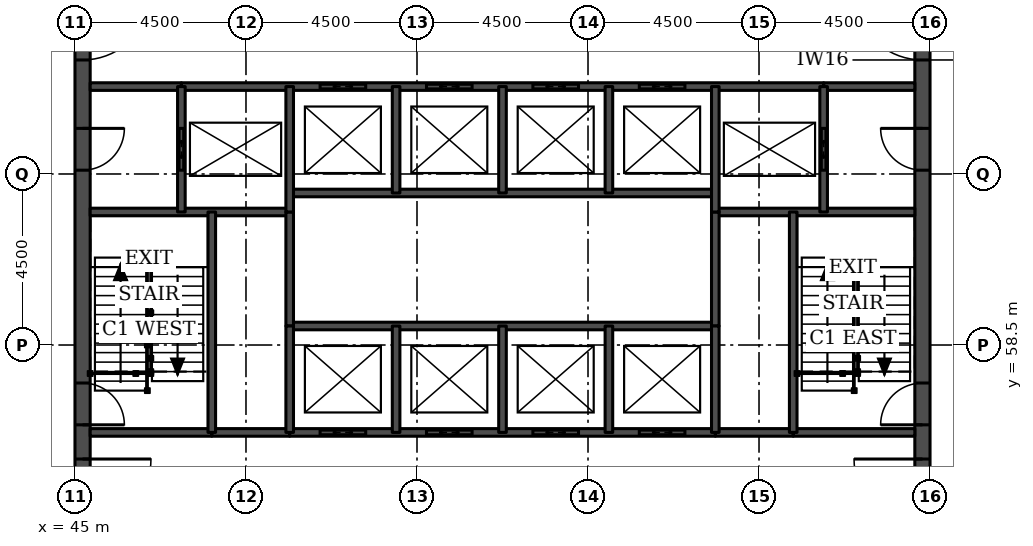
"""IFC4 building model, lengths in metres.
Left out: names, types, materials, properties, quantities, classifications, styles, units other than length and angle.
Written with IfcOpenShell. Run it as: python <this file> out.ifc"""

import sys

from ifc_helpers import new_model, si_unit, direction, frame, frame_2d, origin, place, context, subcontext, project, spatial, rectangle, extrude, element, fill, save


model = new_model("IFC4")
c1 = context("Model", 3, precision=1e-05, world=origin(), true_north=direction((0.0, 1.0)))
c2 = subcontext(c1, "Body", "Model", "MODEL_VIEW")
j1 = project(units=[si_unit("LENGTHUNIT", "METRE"), si_unit("PLANEANGLEUNIT", "RADIAN")], contexts=[c1])
p1 = place(None, origin())
s1 = spatial("IfcSite", under=j1, at=p1, CompositionType="ELEMENT")
p2 = place(p1, origin())
s2 = spatial("IfcBuilding", under=s1, at=p2, CompositionType="ELEMENT")
p3 = place(p2, frame((0.0, 0.0, 184.7)))
s3 = spatial("IfcBuildingStorey", under=s2, at=p3, CompositionType="ELEMENT", Elevation=184.7)
p4 = place(p3, frame((45.2, 49.5, 0.0), z_axis=(0.0, 0.0, 1.0), x_axis=(0.0, 1.0, 0.0)))
e1 = element("IfcWall", 1, at=p4, inside=s3, PredefinedType="SHEAR", context=c2, shape_type="SweptSolid", body=[
    extrude(rectangle(XDim=22.5, YDim=0.4, at=frame_2d((11.25, 0.0))), origin(), (0.0, 0.0, 1.0), 3.7),
])
p5 = place(p4, frame((4.2, 0.0, 0.0)))
e2 = element("IfcOpeningElement", 2, at=p5, cuts=e1, PredefinedType="OPENING", context=c2, shape_type="SweptSolid", body=[
    extrude(rectangle(XDim=1.8, YDim=2.1, at=frame_2d((0.9, 1.05))), frame((0.0, 0.21, 0.0), z_axis=(0.0, -1.0, 0.0), x_axis=(1.0, 0.0, 0.0)), (0.0, 0.0, 1.0), 0.42),
])
p6 = place(p4, frame((6.9, 0.0, 0.0)))
e3 = element("IfcOpeningElement", 3, at=p6, cuts=e1, PredefinedType="OPENING", context=c2, shape_type="SweptSolid", body=[
    extrude(rectangle(XDim=1.1, YDim=2.1, at=frame_2d((0.55, 1.05))), frame((0.0, 0.21, 0.0), z_axis=(0.0, -1.0, 0.0), x_axis=(1.0, 0.0, 0.0)), (0.0, 0.0, 1.0), 0.42),
])
p7 = place(p4, frame((13.6, 0.0, 0.0)))
e4 = element("IfcOpeningElement", 4, at=p7, cuts=e1, PredefinedType="OPENING", context=c2, shape_type="SweptSolid", body=[
    extrude(rectangle(XDim=1.1, YDim=2.1, at=frame_2d((0.55, 1.05))), frame((0.0, 0.21, 0.0), z_axis=(0.0, -1.0, 0.0), x_axis=(1.0, 0.0, 0.0)), (0.0, 0.0, 1.0), 0.42),
])
p8 = place(p4, frame((16.5, 0.0, 0.0)))
e5 = element("IfcOpeningElement", 5, at=p8, cuts=e1, PredefinedType="OPENING", context=c2, shape_type="SweptSolid", body=[
    extrude(rectangle(XDim=1.8, YDim=2.1, at=frame_2d((0.9, 1.05))), frame((0.0, 0.21, 0.0), z_axis=(0.0, -1.0, 0.0), x_axis=(1.0, 0.0, 0.0)), (0.0, 0.0, 1.0), 0.42),
])
p9 = place(p3, frame((67.3, 49.5, 0.0), z_axis=(0.0, 0.0, 1.0), x_axis=(0.0, 1.0, 0.0)))
e6 = element("IfcWall", 6, at=p9, inside=s3, PredefinedType="SHEAR", context=c2, shape_type="SweptSolid", body=[
    extrude(rectangle(XDim=22.5, YDim=0.4, at=frame_2d((11.25, 0.0))), origin(), (0.0, 0.0, 1.0), 3.7),
])
p10 = place(p9, frame((4.2, 0.0, 0.0)))
e7 = element("IfcOpeningElement", 7, at=p10, cuts=e6, PredefinedType="OPENING", context=c2, shape_type="SweptSolid", body=[
    extrude(rectangle(XDim=1.8, YDim=2.1, at=frame_2d((0.9, 1.05))), frame((0.0, 0.21, 0.0), z_axis=(0.0, -1.0, 0.0), x_axis=(1.0, 0.0, 0.0)), (0.0, 0.0, 1.0), 0.42),
])
p11 = place(p9, frame((6.9, 0.0, 0.0)))
e8 = element("IfcOpeningElement", 8, at=p11, cuts=e6, PredefinedType="OPENING", context=c2, shape_type="SweptSolid", body=[
    extrude(rectangle(XDim=1.1, YDim=2.1, at=frame_2d((0.55, 1.05))), frame((0.0, 0.21, 0.0), z_axis=(0.0, -1.0, 0.0), x_axis=(1.0, 0.0, 0.0)), (0.0, 0.0, 1.0), 0.42),
])
p12 = place(p9, frame((13.6, 0.0, 0.0)))
e9 = element("IfcOpeningElement", 9, at=p12, cuts=e6, PredefinedType="OPENING", context=c2, shape_type="SweptSolid", body=[
    extrude(rectangle(XDim=1.1, YDim=2.1, at=frame_2d((0.55, 1.05))), frame((0.0, 0.21, 0.0), z_axis=(0.0, -1.0, 0.0), x_axis=(1.0, 0.0, 0.0)), (0.0, 0.0, 1.0), 0.42),
])
p13 = place(p9, frame((16.5, 0.0, 0.0)))
e10 = element("IfcOpeningElement", 10, at=p13, cuts=e6, PredefinedType="OPENING", context=c2, shape_type="SweptSolid", body=[
    extrude(rectangle(XDim=1.8, YDim=2.1, at=frame_2d((0.9, 1.05))), frame((0.0, 0.21, 0.0), z_axis=(0.0, -1.0, 0.0), x_axis=(1.0, 0.0, 0.0)), (0.0, 0.0, 1.0), 0.42),
])
for number, where, z_axis, x_axis in (
    (11, (48.6, 56.2, 0.0), (0.0, 0.0, 1.0), (1.0, 0.0, 0.0)),
    (12, (61.85, 56.2, 0.0), (0.0, 0.0, 1.0), (1.0, 0.0, 0.0)),
):
    element("IfcWall", number, at=place(p3, frame(where, z_axis=z_axis, x_axis=x_axis)), inside=s3, PredefinedType="SOLIDWALL", context=c2, shape_type="SweptSolid", body=[
        extrude(rectangle(XDim=2.05, YDim=0.2, at=frame_2d((1.025, 0.0))), origin(), (0.0, 0.0, 1.0), 3.55),
    ])
p14 = place(p3, frame((45.4, 56.2, 0.0), z_axis=(0.0, 0.0, 1.0), x_axis=(1.0, 0.0, 0.0)))
e13 = element("IfcWall", 13, at=p14, inside=s3, PredefinedType="SOLIDWALL", context=c2, shape_type="SweptSolid", body=[
    extrude(rectangle(XDim=3.2, YDim=0.2, at=frame_2d((1.6, 0.0))), origin(), (0.0, 0.0, 1.0), 3.55),
])
p15 = place(p3, frame((50.65, 56.2, 0.0), z_axis=(0.0, 0.0, 1.0), x_axis=(1.0, 0.0, 0.0)))
e14 = element("IfcWall", 14, at=p15, inside=s3, PredefinedType="SOLIDWALL", context=c2, shape_type="SweptSolid", body=[
    extrude(rectangle(XDim=11.2, YDim=0.2, at=frame_2d((5.6, 0.0))), origin(), (0.0, 0.0, 1.0), 3.55),
])
p16 = place(p15, frame((0.8, 0.0, 0.0)))
e15 = element("IfcOpeningElement", 15, at=p16, cuts=e14, PredefinedType="OPENING", context=c2, shape_type="SweptSolid", body=[
    extrude(rectangle(XDim=1.2, YDim=2.1, at=frame_2d((0.6, 1.05))), frame((0.0, 0.11, 0.0), z_axis=(0.0, -1.0, 0.0), x_axis=(1.0, 0.0, 0.0)), (0.0, 0.0, 1.0), 0.22),
])
p17 = place(p15, frame((3.6, 0.0, 0.0)))
e16 = element("IfcOpeningElement", 16, at=p17, cuts=e14, PredefinedType="OPENING", context=c2, shape_type="SweptSolid", body=[
    extrude(rectangle(XDim=1.2, YDim=2.1, at=frame_2d((0.6, 1.05))), frame((0.0, 0.11, 0.0), z_axis=(0.0, -1.0, 0.0), x_axis=(1.0, 0.0, 0.0)), (0.0, 0.0, 1.0), 0.22),
])
p18 = place(p15, frame((6.4, 0.0, 0.0)))
e17 = element("IfcOpeningElement", 17, at=p18, cuts=e14, PredefinedType="OPENING", context=c2, shape_type="SweptSolid", body=[
    extrude(rectangle(XDim=1.2, YDim=2.1, at=frame_2d((0.6, 1.05))), frame((0.0, 0.11, 0.0), z_axis=(0.0, -1.0, 0.0), x_axis=(1.0, 0.0, 0.0)), (0.0, 0.0, 1.0), 0.22),
])
p19 = place(p15, frame((9.2, 0.0, 0.0)))
e18 = element("IfcOpeningElement", 18, at=p19, cuts=e14, PredefinedType="OPENING", context=c2, shape_type="SweptSolid", body=[
    extrude(rectangle(XDim=1.2, YDim=2.1, at=frame_2d((0.6, 1.05))), frame((0.0, 0.11, 0.0), z_axis=(0.0, -1.0, 0.0), x_axis=(1.0, 0.0, 0.0)), (0.0, 0.0, 1.0), 0.22),
])
p20 = place(p3, frame((63.9, 56.2, 0.0), z_axis=(0.0, 0.0, 1.0), x_axis=(1.0, 0.0, 0.0)))
e19 = element("IfcWall", 19, at=p20, inside=s3, PredefinedType="SOLIDWALL", context=c2, shape_type="SweptSolid", body=[
    extrude(rectangle(XDim=3.2, YDim=0.2, at=frame_2d((1.6, 0.0))), origin(), (0.0, 0.0, 1.0), 3.55),
])
p21 = place(p3, frame((50.65, 59.0, 0.0), z_axis=(0.0, 0.0, 1.0), x_axis=(1.0, 0.0, 0.0)))
e20 = element("IfcWall", 20, at=p21, inside=s3, PredefinedType="SOLIDWALL", context=c2, shape_type="SweptSolid", body=[
    extrude(rectangle(XDim=11.2, YDim=0.2, at=frame_2d((5.6, 0.0))), origin(), (0.0, 0.0, 1.0), 3.7),
])
for number, where, z_axis, x_axis in (
    (21, (45.4, 62.0, 0.0), (0.0, 0.0, 1.0), (1.0, 0.0, 0.0)),
    (22, (61.85, 62.0, 0.0), (0.0, 0.0, 1.0), (1.0, 0.0, 0.0)),
):
    element("IfcWall", number, at=place(p3, frame(where, z_axis=z_axis, x_axis=x_axis)), inside=s3, PredefinedType="SOLIDWALL", context=c2, shape_type="SweptSolid", body=[
        extrude(rectangle(XDim=5.25, YDim=0.2, at=frame_2d((2.625, 0.0))), origin(), (0.0, 0.0, 1.0), 3.55),
    ])
p22 = place(p3, frame((50.65, 62.5, 0.0), z_axis=(0.0, 0.0, 1.0), x_axis=(1.0, 0.0, 0.0)))
e23 = element("IfcWall", 23, at=p22, inside=s3, PredefinedType="SOLIDWALL", context=c2, shape_type="SweptSolid", body=[
    extrude(rectangle(XDim=11.2, YDim=0.2, at=frame_2d((5.6, 0.0))), origin(), (0.0, 0.0, 1.0), 3.7),
])
for number, where, z_axis, x_axis in (
    (24, (45.4, 65.3, 0.0), (0.0, 0.0, 1.0), (1.0, 0.0, 0.0)),
    (25, (64.7, 65.3, 0.0), (0.0, 0.0, 1.0), (1.0, 0.0, 0.0)),
):
    element("IfcWall", number, at=place(p3, frame(where, z_axis=z_axis, x_axis=x_axis)), inside=s3, PredefinedType="SOLIDWALL", context=c2, shape_type="SweptSolid", body=[
        extrude(rectangle(XDim=2.4, YDim=0.2, at=frame_2d((1.2, 0.0))), origin(), (0.0, 0.0, 1.0), 3.55),
    ])
p23 = place(p3, frame((47.8, 65.3, 0.0), z_axis=(0.0, 0.0, 1.0), x_axis=(1.0, 0.0, 0.0)))
e26 = element("IfcWall", 26, at=p23, inside=s3, PredefinedType="SOLIDWALL", context=c2, shape_type="SweptSolid", body=[
    extrude(rectangle(XDim=16.9, YDim=0.2, at=frame_2d((8.45, 0.0))), origin(), (0.0, 0.0, 1.0), 3.55),
])
p24 = place(p23, frame((3.65, 0.0, 0.0)))
e27 = element("IfcOpeningElement", 27, at=p24, cuts=e26, PredefinedType="OPENING", context=c2, shape_type="SweptSolid", body=[
    extrude(rectangle(XDim=1.2, YDim=2.1, at=frame_2d((0.6, 1.05))), frame((0.0, 0.11, 0.0), z_axis=(0.0, -1.0, 0.0), x_axis=(1.0, 0.0, 0.0)), (0.0, 0.0, 1.0), 0.22),
])
p25 = place(p23, frame((6.45, 0.0, 0.0)))
e28 = element("IfcOpeningElement", 28, at=p25, cuts=e26, PredefinedType="OPENING", context=c2, shape_type="SweptSolid", body=[
    extrude(rectangle(XDim=1.2, YDim=2.1, at=frame_2d((0.6, 1.05))), frame((0.0, 0.11, 0.0), z_axis=(0.0, -1.0, 0.0), x_axis=(1.0, 0.0, 0.0)), (0.0, 0.0, 1.0), 0.22),
])
p26 = place(p23, frame((9.25, 0.0, 0.0)))
e29 = element("IfcOpeningElement", 29, at=p26, cuts=e26, PredefinedType="OPENING", context=c2, shape_type="SweptSolid", body=[
    extrude(rectangle(XDim=1.2, YDim=2.1, at=frame_2d((0.6, 1.05))), frame((0.0, 0.11, 0.0), z_axis=(0.0, -1.0, 0.0), x_axis=(1.0, 0.0, 0.0)), (0.0, 0.0, 1.0), 0.22),
])
p27 = place(p23, frame((12.05, 0.0, 0.0)))
e30 = element("IfcOpeningElement", 30, at=p27, cuts=e26, PredefinedType="OPENING", context=c2, shape_type="SweptSolid", body=[
    extrude(rectangle(XDim=1.2, YDim=2.1, at=frame_2d((0.6, 1.05))), frame((0.0, 0.11, 0.0), z_axis=(0.0, -1.0, 0.0), x_axis=(1.0, 0.0, 0.0)), (0.0, 0.0, 1.0), 0.22),
])
p28 = place(p3, frame((47.8, 62.0, 0.0), z_axis=(0.0, 0.0, 1.0), x_axis=(0.0, 1.0, 0.0)))
e31 = element("IfcWall", 31, at=p28, inside=s3, PredefinedType="SOLIDWALL", context=c2, shape_type="SweptSolid", body=[
    extrude(rectangle(XDim=3.3, YDim=0.2, at=frame_2d((1.65, 0.0))), origin(), (0.0, 0.0, 1.0), 3.55),
])
p29 = place(p28, frame((1.1, 0.0, 0.0)))
e32 = element("IfcOpeningElement", 32, at=p29, cuts=e31, PredefinedType="OPENING", context=c2, shape_type="SweptSolid", body=[
    extrude(rectangle(XDim=1.1, YDim=2.1, at=frame_2d((0.55, 1.05))), frame((0.0, 0.11, 0.0), z_axis=(0.0, -1.0, 0.0), x_axis=(1.0, 0.0, 0.0)), (0.0, 0.0, 1.0), 0.22),
])
p30 = place(p3, frame((48.6, 56.2, 0.0), z_axis=(0.0, 0.0, 1.0), x_axis=(0.0, 1.0, 0.0)))
e33 = element("IfcWall", 33, at=p30, inside=s3, PredefinedType="SOLIDWALL", context=c2, shape_type="SweptSolid", body=[
    extrude(rectangle(XDim=5.8, YDim=0.2, at=frame_2d((2.9, 0.0))), origin(), (0.0, 0.0, 1.0), 3.55),
])
p31 = place(p3, frame((50.65, 59.0, 0.0), z_axis=(0.0, 0.0, 1.0), x_axis=(0.0, 1.0, 0.0)))
e34 = element("IfcWall", 34, at=p31, inside=s3, PredefinedType="SOLIDWALL", context=c2, shape_type="SweptSolid", body=[
    extrude(rectangle(XDim=3.0, YDim=0.2, at=frame_2d((1.5, 0.0))), origin(), (0.0, 0.0, 1.0), 3.7),
])
p32 = place(p3, frame((50.65, 56.2, 0.0), z_axis=(0.0, 0.0, 1.0), x_axis=(0.0, 1.0, 0.0)))
e35 = element("IfcWall", 35, at=p32, inside=s3, PredefinedType="SOLIDWALL", context=c2, shape_type="SweptSolid", body=[
    extrude(rectangle(XDim=2.8, YDim=0.2, at=frame_2d((1.4, 0.0))), origin(), (0.0, 0.0, 1.0), 3.55),
])
p33 = place(p3, frame((50.65, 62.0, 0.0), z_axis=(0.0, 0.0, 1.0), x_axis=(0.0, 1.0, 0.0)))
e36 = element("IfcWall", 36, at=p33, inside=s3, PredefinedType="SOLIDWALL", context=c2, shape_type="SweptSolid", body=[
    extrude(rectangle(XDim=3.3, YDim=0.2, at=frame_2d((1.65, 0.0))), origin(), (0.0, 0.0, 1.0), 3.55),
])
for number, where, z_axis, x_axis in (
    (37, (53.45, 56.2, 0.0), (0.0, 0.0, 1.0), (0.0, 1.0, 0.0)),
    (38, (53.45, 62.5, 0.0), (0.0, 0.0, 1.0), (0.0, 1.0, 0.0)),
    (39, (56.25, 56.2, 0.0), (0.0, 0.0, 1.0), (0.0, 1.0, 0.0)),
    (40, (56.25, 62.5, 0.0), (0.0, 0.0, 1.0), (0.0, 1.0, 0.0)),
    (41, (59.05, 56.2, 0.0), (0.0, 0.0, 1.0), (0.0, 1.0, 0.0)),
    (42, (59.05, 62.5, 0.0), (0.0, 0.0, 1.0), (0.0, 1.0, 0.0)),
):
    element("IfcWall", number, at=place(p3, frame(where, z_axis=z_axis, x_axis=x_axis)), inside=s3, PredefinedType="SOLIDWALL", context=c2, shape_type="SweptSolid", body=[
        extrude(rectangle(XDim=2.8, YDim=0.2, at=frame_2d((1.4, 0.0))), origin(), (0.0, 0.0, 1.0), 3.55),
    ])
p34 = place(p3, frame((61.85, 59.0, 0.0), z_axis=(0.0, 0.0, 1.0), x_axis=(0.0, 1.0, 0.0)))
e43 = element("IfcWall", 43, at=p34, inside=s3, PredefinedType="SOLIDWALL", context=c2, shape_type="SweptSolid", body=[
    extrude(rectangle(XDim=3.0, YDim=0.2, at=frame_2d((1.5, 0.0))), origin(), (0.0, 0.0, 1.0), 3.7),
])
p35 = place(p3, frame((61.85, 56.2, 0.0), z_axis=(0.0, 0.0, 1.0), x_axis=(0.0, 1.0, 0.0)))
e44 = element("IfcWall", 44, at=p35, inside=s3, PredefinedType="SOLIDWALL", context=c2, shape_type="SweptSolid", body=[
    extrude(rectangle(XDim=2.8, YDim=0.2, at=frame_2d((1.4, 0.0))), origin(), (0.0, 0.0, 1.0), 3.55),
])
p36 = place(p3, frame((61.85, 62.0, 0.0), z_axis=(0.0, 0.0, 1.0), x_axis=(0.0, 1.0, 0.0)))
e45 = element("IfcWall", 45, at=p36, inside=s3, PredefinedType="SOLIDWALL", context=c2, shape_type="SweptSolid", body=[
    extrude(rectangle(XDim=3.3, YDim=0.2, at=frame_2d((1.65, 0.0))), origin(), (0.0, 0.0, 1.0), 3.55),
])
p37 = place(p3, frame((63.9, 56.2, 0.0), z_axis=(0.0, 0.0, 1.0), x_axis=(0.0, 1.0, 0.0)))
e46 = element("IfcWall", 46, at=p37, inside=s3, PredefinedType="SOLIDWALL", context=c2, shape_type="SweptSolid", body=[
    extrude(rectangle(XDim=5.8, YDim=0.2, at=frame_2d((2.9, 0.0))), origin(), (0.0, 0.0, 1.0), 3.55),
])
p38 = place(p3, frame((64.7, 62.0, 0.0), z_axis=(0.0, 0.0, 1.0), x_axis=(0.0, 1.0, 0.0)))
e47 = element("IfcWall", 47, at=p38, inside=s3, PredefinedType="SOLIDWALL", context=c2, shape_type="SweptSolid", body=[
    extrude(rectangle(XDim=3.3, YDim=0.2, at=frame_2d((1.65, 0.0))), origin(), (0.0, 0.0, 1.0), 3.55),
])
p39 = place(p38, frame((1.1, 0.0, 0.0)))
e48 = element("IfcOpeningElement", 48, at=p39, cuts=e47, PredefinedType="OPENING", context=c2, shape_type="SweptSolid", body=[
    extrude(rectangle(XDim=1.1, YDim=2.1, at=frame_2d((0.55, 1.05))), frame((0.0, 0.11, 0.0), z_axis=(0.0, -1.0, 0.0), x_axis=(1.0, 0.0, 0.0)), (0.0, 0.0, 1.0), 0.22),
])
p40 = place(p16, origin())
e49 = element("IfcDoor", 49, at=p40, inside=s3, OperationType="DOUBLE_DOOR_SLIDING", PredefinedType="DOOR", context=c2, shape_type="SweptSolid", body=[
    extrude(rectangle(XDim=1.2, YDim=2.1, at=frame_2d((0.6, 1.05))), frame((0.0, 0.025, 0.0), z_axis=(0.0, -1.0, 0.0), x_axis=(1.0, 0.0, 0.0)), (0.0, 0.0, 1.0), 0.05),
])
fill(e15, e49)
p41 = place(p17, origin())
e50 = element("IfcDoor", 50, at=p41, inside=s3, OperationType="DOUBLE_DOOR_SLIDING", PredefinedType="DOOR", context=c2, shape_type="SweptSolid", body=[
    extrude(rectangle(XDim=1.2, YDim=2.1, at=frame_2d((0.6, 1.05))), frame((0.0, 0.025, 0.0), z_axis=(0.0, -1.0, 0.0), x_axis=(1.0, 0.0, 0.0)), (0.0, 0.0, 1.0), 0.05),
])
fill(e16, e50)
p42 = place(p18, origin())
e51 = element("IfcDoor", 51, at=p42, inside=s3, OperationType="DOUBLE_DOOR_SLIDING", PredefinedType="DOOR", context=c2, shape_type="SweptSolid", body=[
    extrude(rectangle(XDim=1.2, YDim=2.1, at=frame_2d((0.6, 1.05))), frame((0.0, 0.025, 0.0), z_axis=(0.0, -1.0, 0.0), x_axis=(1.0, 0.0, 0.0)), (0.0, 0.0, 1.0), 0.05),
])
fill(e17, e51)
p43 = place(p19, origin())
e52 = element("IfcDoor", 52, at=p43, inside=s3, OperationType="DOUBLE_DOOR_SLIDING", PredefinedType="DOOR", context=c2, shape_type="SweptSolid", body=[
    extrude(rectangle(XDim=1.2, YDim=2.1, at=frame_2d((0.6, 1.05))), frame((0.0, 0.025, 0.0), z_axis=(0.0, -1.0, 0.0), x_axis=(1.0, 0.0, 0.0)), (0.0, 0.0, 1.0), 0.05),
])
fill(e18, e52)
p44 = place(p24, origin())
e53 = element("IfcDoor", 53, at=p44, inside=s3, OperationType="DOUBLE_DOOR_SLIDING", PredefinedType="DOOR", context=c2, shape_type="SweptSolid", body=[
    extrude(rectangle(XDim=1.2, YDim=2.1, at=frame_2d((0.6, 1.05))), frame((0.0, 0.025, 0.0), z_axis=(0.0, -1.0, 0.0), x_axis=(1.0, 0.0, 0.0)), (0.0, 0.0, 1.0), 0.05),
])
fill(e27, e53)
p45 = place(p25, origin())
e54 = element("IfcDoor", 54, at=p45, inside=s3, OperationType="DOUBLE_DOOR_SLIDING", PredefinedType="DOOR", context=c2, shape_type="SweptSolid", body=[
    extrude(rectangle(XDim=1.2, YDim=2.1, at=frame_2d((0.6, 1.05))), frame((0.0, 0.025, 0.0), z_axis=(0.0, -1.0, 0.0), x_axis=(1.0, 0.0, 0.0)), (0.0, 0.0, 1.0), 0.05),
])
fill(e28, e54)
p46 = place(p26, origin())
e55 = element("IfcDoor", 55, at=p46, inside=s3, OperationType="DOUBLE_DOOR_SLIDING", PredefinedType="DOOR", context=c2, shape_type="SweptSolid", body=[
    extrude(rectangle(XDim=1.2, YDim=2.1, at=frame_2d((0.6, 1.05))), frame((0.0, 0.025, 0.0), z_axis=(0.0, -1.0, 0.0), x_axis=(1.0, 0.0, 0.0)), (0.0, 0.0, 1.0), 0.05),
])
fill(e29, e55)
p47 = place(p27, origin())
e56 = element("IfcDoor", 56, at=p47, inside=s3, OperationType="DOUBLE_DOOR_SLIDING", PredefinedType="DOOR", context=c2, shape_type="SweptSolid", body=[
    extrude(rectangle(XDim=1.2, YDim=2.1, at=frame_2d((0.6, 1.05))), frame((0.0, 0.025, 0.0), z_axis=(0.0, -1.0, 0.0), x_axis=(1.0, 0.0, 0.0)), (0.0, 0.0, 1.0), 0.05),
])
fill(e30, e56)
p48 = place(p29, origin())
e57 = element("IfcDoor", 57, at=p48, inside=s3, OperationType="DOUBLE_DOOR_SLIDING", PredefinedType="DOOR", context=c2, shape_type="SweptSolid", body=[
    extrude(rectangle(XDim=1.1, YDim=2.1, at=frame_2d((0.55, 1.05))), frame((0.0, 0.025, 0.0), z_axis=(0.0, -1.0, 0.0), x_axis=(1.0, 0.0, 0.0)), (0.0, 0.0, 1.0), 0.05),
])
fill(e32, e57)
p49 = place(p39, origin())
e58 = element("IfcDoor", 58, at=p49, inside=s3, OperationType="DOUBLE_DOOR_SLIDING", PredefinedType="DOOR", context=c2, shape_type="SweptSolid", body=[
    extrude(rectangle(XDim=1.1, YDim=2.1, at=frame_2d((0.55, 1.05))), frame((0.0, 0.025, 0.0), z_axis=(0.0, -1.0, 0.0), x_axis=(1.0, 0.0, 0.0)), (0.0, 0.0, 1.0), 0.05),
])
fill(e48, e58)
p50 = place(p5, frame((1.8, 0.0, 0.0), z_axis=(0.0, 0.0, 1.0), x_axis=(-1.0, 0.0, 0.0)))
e59 = element("IfcDoor", 59, at=p50, inside=s3, OperationType="SINGLE_SWING_LEFT", PredefinedType="DOOR", context=c2, shape_type="SweptSolid", body=[
    extrude(rectangle(XDim=1.8, YDim=2.1, at=frame_2d((0.9, 1.05))), frame((0.0, 0.025, 0.0), z_axis=(0.0, -1.0, 0.0), x_axis=(1.0, 0.0, 0.0)), (0.0, 0.0, 1.0), 0.05),
])
fill(e2, e59)
p51 = place(p6, frame((1.1, 0.0, 0.0), z_axis=(0.0, 0.0, 1.0), x_axis=(-1.0, 0.0, 0.0)))
e60 = element("IfcDoor", 60, at=p51, inside=s3, OperationType="SINGLE_SWING_RIGHT", PredefinedType="DOOR", context=c2, shape_type="SweptSolid", body=[
    extrude(rectangle(XDim=1.1, YDim=2.1, at=frame_2d((0.55, 1.05))), frame((0.0, 0.025, 0.0), z_axis=(0.0, -1.0, 0.0), x_axis=(1.0, 0.0, 0.0)), (0.0, 0.0, 1.0), 0.05),
])
fill(e3, e60)
p52 = place(p7, frame((1.1, 0.0, 0.0), z_axis=(0.0, 0.0, 1.0), x_axis=(-1.0, 0.0, 0.0)))
e61 = element("IfcDoor", 61, at=p52, inside=s3, OperationType="SINGLE_SWING_LEFT", PredefinedType="DOOR", context=c2, shape_type="SweptSolid", body=[
    extrude(rectangle(XDim=1.1, YDim=2.1, at=frame_2d((0.55, 1.05))), frame((0.0, 0.025, 0.0), z_axis=(0.0, -1.0, 0.0), x_axis=(1.0, 0.0, 0.0)), (0.0, 0.0, 1.0), 0.05),
])
fill(e4, e61)
p53 = place(p8, frame((1.8, 0.0, 0.0), z_axis=(0.0, 0.0, 1.0), x_axis=(-1.0, 0.0, 0.0)))
e62 = element("IfcDoor", 62, at=p53, inside=s3, OperationType="SINGLE_SWING_LEFT", PredefinedType="DOOR", context=c2, shape_type="SweptSolid", body=[
    extrude(rectangle(XDim=1.8, YDim=2.1, at=frame_2d((0.9, 1.05))), frame((0.0, 0.025, 0.0), z_axis=(0.0, -1.0, 0.0), x_axis=(1.0, 0.0, 0.0)), (0.0, 0.0, 1.0), 0.05),
])
fill(e5, e62)
p54 = place(p10, origin())
e63 = element("IfcDoor", 63, at=p54, inside=s3, OperationType="SINGLE_SWING_RIGHT", PredefinedType="DOOR", context=c2, shape_type="SweptSolid", body=[
    extrude(rectangle(XDim=1.8, YDim=2.1, at=frame_2d((0.9, 1.05))), frame((0.0, 0.025, 0.0), z_axis=(0.0, -1.0, 0.0), x_axis=(1.0, 0.0, 0.0)), (0.0, 0.0, 1.0), 0.05),
])
fill(e7, e63)
p55 = place(p11, origin())
e64 = element("IfcDoor", 64, at=p55, inside=s3, OperationType="SINGLE_SWING_LEFT", PredefinedType="DOOR", context=c2, shape_type="SweptSolid", body=[
    extrude(rectangle(XDim=1.1, YDim=2.1, at=frame_2d((0.55, 1.05))), frame((0.0, 0.025, 0.0), z_axis=(0.0, -1.0, 0.0), x_axis=(1.0, 0.0, 0.0)), (0.0, 0.0, 1.0), 0.05),
])
fill(e8, e64)
p56 = place(p12, origin())
e65 = element("IfcDoor", 65, at=p56, inside=s3, OperationType="SINGLE_SWING_RIGHT", PredefinedType="DOOR", context=c2, shape_type="SweptSolid", body=[
    extrude(rectangle(XDim=1.1, YDim=2.1, at=frame_2d((0.55, 1.05))), frame((0.0, 0.025, 0.0), z_axis=(0.0, -1.0, 0.0), x_axis=(1.0, 0.0, 0.0)), (0.0, 0.0, 1.0), 0.05),
])
fill(e9, e65)
p57 = place(p13, origin())
e66 = element("IfcDoor", 66, at=p57, inside=s3, OperationType="SINGLE_SWING_RIGHT", PredefinedType="DOOR", context=c2, shape_type="SweptSolid", body=[
    extrude(rectangle(XDim=1.8, YDim=2.1, at=frame_2d((0.9, 1.05))), frame((0.0, 0.025, 0.0), z_axis=(0.0, -1.0, 0.0), x_axis=(1.0, 0.0, 0.0)), (0.0, 0.0, 1.0), 0.05),
])
fill(e10, e66)
save(model, sys.argv[1])
